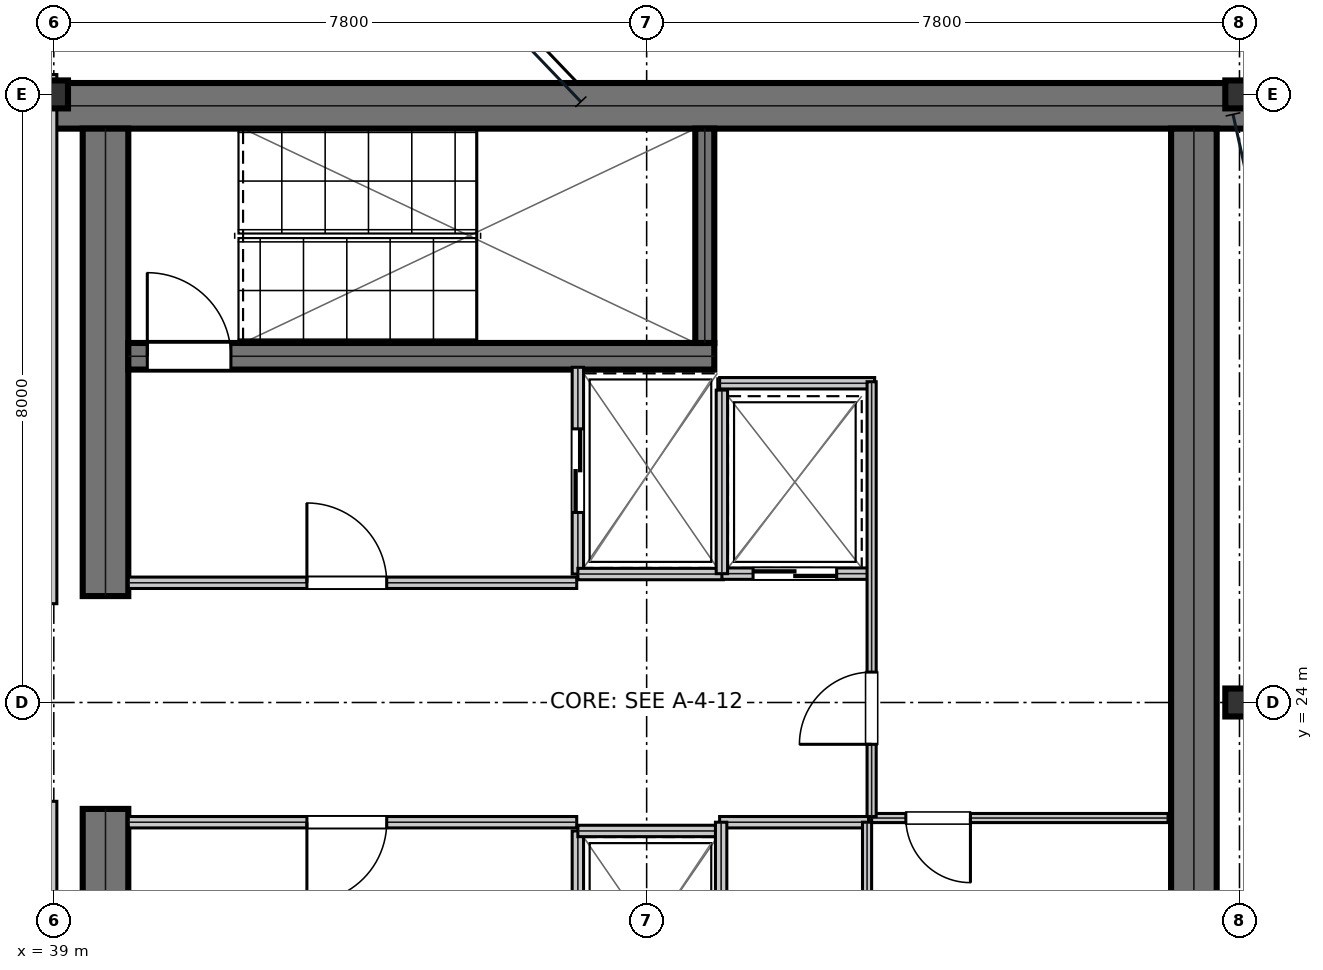
"""IFC4 building model, lengths in metres.
Left out: names, types, materials, properties, quantities, classifications, styles, units other than length and angle.
Written with IfcOpenShell. Run it as: python <this file> out.ifc"""

import sys

from ifc_helpers import new_model, si_unit, direction, frame, frame_2d, origin, origin_2d, place, context, subcontext, project, spatial, rectangle, i_section, extrude, element, fill, save


model = new_model("IFC4")
c1 = context("Model", 3, precision=1e-05, world=origin(), true_north=direction((0.0, 1.0)))
c2 = subcontext(c1, "Body", "Model", "MODEL_VIEW")
j1 = project(units=[si_unit("LENGTHUNIT", "METRE"), si_unit("PLANEANGLEUNIT", "RADIAN")], contexts=[c1])
p1 = place(None, origin())
s1 = spatial("IfcSite", under=j1, at=p1, CompositionType="ELEMENT")
p2 = place(p1, origin())
s2 = spatial("IfcBuilding", under=s1, at=p2, CompositionType="ELEMENT")
p3 = place(p2, frame((0.0, 0.0, 299.25)))
s3 = spatial("IfcBuildingStorey", under=s2, at=p3, CompositionType="ELEMENT", Elevation=299.25)
p4 = place(p3, frame((38.8, 31.85, 0.0), z_axis=(0.0, 0.0, 1.0), x_axis=(1.0, 0.0, 0.0)))
e1 = element("IfcWall", 1, at=p4, inside=s3, PredefinedType="SHEAR", context=c2, shape_type="SweptSolid", body=[
    extrude(rectangle(XDim=16.0, YDim=0.6, at=frame_2d((8.0, 0.0))), origin(), (0.0, 0.0, 1.0), 3.81),
])
for number, where, z_axis, x_axis in (
    (2, (39.68, 16.45, 0.0), (0.0, 0.0, 1.0), (0.0, 1.0, 0.0)),
    (3, (39.68, 25.4, 0.0), (0.0, 0.0, 1.0), (0.0, 1.0, 0.0)),
):
    element("IfcWall", number, at=place(p3, frame(where, z_axis=z_axis, x_axis=x_axis)), inside=s3, PredefinedType="SHEAR", context=c2, shape_type="SweptSolid", body=[
        extrude(rectangle(XDim=6.15, YDim=0.6, at=frame_2d((3.075, 0.0))), origin(), (0.0, 0.0, 1.0), 3.81),
    ])
p5 = place(p3, frame((54.0, 16.45, 0.0), z_axis=(0.0, 0.0, 1.0), x_axis=(0.0, 1.0, 0.0)))
e4 = element("IfcWall", 4, at=p5, inside=s3, PredefinedType="SHEAR", context=c2, shape_type="SweptSolid", body=[
    extrude(rectangle(XDim=15.1, YDim=0.6, at=frame_2d((7.55, 0.0))), origin(), (0.0, 0.0, 1.0), 3.81),
])
p6 = place(p3, frame((39.98, 28.555, 0.0), z_axis=(0.0, 0.0, 1.0), x_axis=(1.0, 0.0, 0.0)))
e5 = element("IfcWall", 5, at=p6, inside=s3, PredefinedType="SHEAR", context=c2, shape_type="SweptSolid", body=[
    extrude(rectangle(XDim=7.71, YDim=0.35, at=frame_2d((3.855, 0.0))), origin(), (0.0, 0.0, 1.0), 3.81),
])
p7 = place(p6, frame((0.25, 0.0, 0.0)))
e6 = element("IfcOpeningElement", 6, at=p7, cuts=e5, PredefinedType="OPENING", context=c2, shape_type="SweptSolid", body=[
    extrude(rectangle(XDim=1.1, YDim=2.15, at=frame_2d((0.55, 1.075))), frame((0.0, 0.185, 0.0), z_axis=(0.0, -1.0, 0.0), x_axis=(1.0, 0.0, 0.0)), (0.0, 0.0, 1.0), 0.37),
])
p8 = place(p3, frame((47.565, 28.73, 0.0), z_axis=(0.0, 0.0, 1.0), x_axis=(0.0, 1.0, 0.0)))
e7 = element("IfcWall", 7, at=p8, inside=s3, PredefinedType="SHEAR", context=c2, shape_type="SweptSolid", body=[
    extrude(rectangle(XDim=2.82, YDim=0.25, at=frame_2d((1.41, 0.0))), origin(), (0.0, 0.0, 1.0), 3.81),
])
for number, where, z_axis, x_axis in (
    (8, (39.0, 32.0, 0.0), (0.0, 0.0, 1.0), (1.0, 0.0, 0.0)),
    (9, (54.6, 24.0, 0.0), (0.0, 0.0, 1.0), (1.0, 0.0, 0.0)),
    (10, (54.6, 32.0, 0.0), (0.0, 0.0, 1.0), (1.0, 0.0, 0.0)),
):
    element("IfcColumn", number, at=place(p3, frame(where, z_axis=z_axis, x_axis=x_axis)), inside=s3, PredefinedType="COLUMN", context=c2, shape_type="SweptSolid", body=[
        extrude(i_section(OverallWidth=0.373, OverallDepth=0.368, WebThickness=0.015, FlangeThickness=0.024, at=origin_2d()), origin(), (0.0, 0.0, 1.0), 4.044),
    ])
p9 = place(p3, frame((39.98, 25.575, 0.0), z_axis=(0.0, 0.0, 1.0), x_axis=(1.0, 0.0, 0.0)))
e11 = element("IfcWall", 11, at=p9, inside=s3, PredefinedType="PARTITIONING", context=c2, shape_type="SweptSolid", body=[
    extrude(rectangle(XDim=5.9, YDim=0.15, at=frame_2d((2.95, 0.0))), origin(), (0.0, 0.0, 1.0), 3.81),
])
p10 = place(p9, frame((2.35, 0.0, 0.0)))
e12 = element("IfcOpeningElement", 12, at=p10, cuts=e11, PredefinedType="OPENING", context=c2, shape_type="SweptSolid", body=[
    extrude(rectangle(XDim=1.05, YDim=2.15, at=frame_2d((0.525, 1.075))), frame((0.0, 0.085, 0.0), z_axis=(0.0, -1.0, 0.0), x_axis=(1.0, 0.0, 0.0)), (0.0, 0.0, 1.0), 0.17),
])
p11 = place(p3, frame((39.98, 22.425, 0.0), z_axis=(0.0, 0.0, 1.0), x_axis=(1.0, 0.0, 0.0)))
e13 = element("IfcWall", 13, at=p11, inside=s3, PredefinedType="PARTITIONING", context=c2, shape_type="SweptSolid", body=[
    extrude(rectangle(XDim=5.9, YDim=0.15, at=frame_2d((2.95, 0.0))), origin(), (0.0, 0.0, 1.0), 3.81),
])
p12 = place(p11, frame((2.35, 0.0, 0.0)))
e14 = element("IfcOpeningElement", 14, at=p12, cuts=e13, PredefinedType="OPENING", context=c2, shape_type="SweptSolid", body=[
    extrude(rectangle(XDim=1.05, YDim=2.15, at=frame_2d((0.525, 1.075))), frame((0.0, 0.085, 0.0), z_axis=(0.0, -1.0, 0.0), x_axis=(1.0, 0.0, 0.0)), (0.0, 0.0, 1.0), 0.17),
])
p13 = place(p3, frame((45.895, 25.69, 0.0), z_axis=(0.0, 0.0, 1.0), x_axis=(0.0, 1.0, 0.0)))
e15 = element("IfcWall", 15, at=p13, inside=s3, PredefinedType="PARTITIONING", context=c2, shape_type="SweptSolid", body=[
    extrude(rectangle(XDim=2.72, YDim=0.15, at=frame_2d((1.36, 0.0))), origin(), (0.0, 0.0, 1.0), 3.81),
])
p14 = place(p13, frame((0.81, 0.0, 0.0)))
e16 = element("IfcOpeningElement", 16, at=p14, cuts=e15, PredefinedType="OPENING", context=c2, shape_type="SweptSolid", body=[
    extrude(rectangle(XDim=1.1, YDim=2.15, at=frame_2d((0.55, 1.075))), frame((0.0, 0.085, 0.0), z_axis=(0.0, -1.0, 0.0), x_axis=(1.0, 0.0, 0.0)), (0.0, 0.0, 1.0), 0.17),
])
p15 = place(p3, frame((45.895, 25.69, 0.0), z_axis=(0.0, 0.0, 1.0), x_axis=(1.0, 0.0, 0.0)))
e17 = element("IfcWall", 17, at=p15, inside=s3, PredefinedType="PARTITIONING", context=c2, shape_type="SweptSolid", body=[
    extrude(rectangle(XDim=1.915, YDim=0.15, at=frame_2d((0.958, 0.0))), origin(), (0.0, 0.0, 1.0), 3.81),
])
p16 = place(p3, frame((45.895, 19.59, 0.0), z_axis=(0.0, 0.0, 1.0), x_axis=(0.0, 1.0, 0.0)))
e18 = element("IfcWall", 18, at=p16, inside=s3, PredefinedType="PARTITIONING", context=c2, shape_type="SweptSolid", body=[
    extrude(rectangle(XDim=2.72, YDim=0.15, at=frame_2d((1.36, 0.0))), origin(), (0.0, 0.0, 1.0), 3.81),
])
p17 = place(p16, frame((0.81, 0.0, 0.0)))
e19 = element("IfcOpeningElement", 19, at=p17, cuts=e18, PredefinedType="OPENING", context=c2, shape_type="SweptSolid", body=[
    extrude(rectangle(XDim=1.1, YDim=2.15, at=frame_2d((0.55, 1.075))), frame((0.0, 0.085, 0.0), z_axis=(0.0, -1.0, 0.0), x_axis=(1.0, 0.0, 0.0)), (0.0, 0.0, 1.0), 0.17),
])
p18 = place(p3, frame((45.895, 22.31, 0.0), z_axis=(0.0, 0.0, 1.0), x_axis=(1.0, 0.0, 0.0)))
e20 = element("IfcWall", 20, at=p18, inside=s3, PredefinedType="PARTITIONING", context=c2, shape_type="SweptSolid", body=[
    extrude(rectangle(XDim=1.915, YDim=0.15, at=frame_2d((0.958, 0.0))), origin(), (0.0, 0.0, 1.0), 3.81),
])
p19 = place(p3, frame((47.79, 25.695, 0.0), z_axis=(0.0, 0.0, 1.0), x_axis=(1.0, 0.0, 0.0)))
e21 = element("IfcWall", 21, at=p19, inside=s3, PredefinedType="PARTITIONING", context=c2, shape_type="SweptSolid", body=[
    extrude(rectangle(XDim=1.92, YDim=0.15, at=frame_2d((0.96, 0.0))), origin(), (0.0, 0.0, 1.0), 3.81),
])
p20 = place(p19, frame((0.41, 0.0, 0.0)))
e22 = element("IfcOpeningElement", 22, at=p20, cuts=e21, PredefinedType="OPENING", context=c2, shape_type="SweptSolid", body=[
    extrude(rectangle(XDim=1.1, YDim=2.15, at=frame_2d((0.55, 1.075))), frame((0.0, 0.085, 0.0), z_axis=(0.0, -1.0, 0.0), x_axis=(1.0, 0.0, 0.0)), (0.0, 0.0, 1.0), 0.17),
])
p21 = place(p3, frame((47.79, 25.695, 0.0), z_axis=(0.0, 0.0, 1.0), x_axis=(0.0, 1.0, 0.0)))
e23 = element("IfcWall", 23, at=p21, inside=s3, PredefinedType="PARTITIONING", context=c2, shape_type="SweptSolid", body=[
    extrude(rectangle(XDim=2.415, YDim=0.15, at=frame_2d((1.208, 0.0))), origin(), (0.0, 0.0, 1.0), 3.81),
])
p22 = place(p3, frame((47.76, 22.425, 0.0), z_axis=(0.0, 0.0, 1.0), x_axis=(1.0, 0.0, 0.0)))
e24 = element("IfcWall", 24, at=p22, inside=s3, PredefinedType="PARTITIONING", context=c2, shape_type="SweptSolid", body=[
    extrude(rectangle(XDim=1.96, YDim=0.15, at=frame_2d((0.98, 0.0))), origin(), (0.0, 0.0, 1.0), 3.81),
])
p23 = place(p3, frame((47.78, 16.45, 0.0), z_axis=(0.0, 0.0, 1.0), x_axis=(0.0, 1.0, 0.0)))
e25 = element("IfcWall", 25, at=p23, inside=s3, PredefinedType="PARTITIONING", context=c2, shape_type="SweptSolid", body=[
    extrude(rectangle(XDim=5.975, YDim=0.15, at=frame_2d((2.988, 0.0))), origin(), (0.0, 0.0, 1.0), 3.81),
])
p24 = place(p3, frame((49.7, 16.48, 0.0), z_axis=(0.0, 0.0, 1.0), x_axis=(0.0, 1.0, 0.0)))
e26 = element("IfcWall", 26, at=p24, inside=s3, PredefinedType="PARTITIONING", context=c2, shape_type="SweptSolid", body=[
    extrude(rectangle(XDim=5.945, YDim=0.12, at=frame_2d((2.973, 0.0))), origin(), (0.0, 0.0, 1.0), 3.81),
])
p25 = place(p24, frame((1.8, 0.0, 0.0)))
e27 = element("IfcOpeningElement", 27, at=p25, cuts=e26, PredefinedType="OPENING", context=c2, shape_type="SweptSolid", body=[
    extrude(rectangle(XDim=0.85, YDim=2.15, at=frame_2d((0.425, 1.075))), frame((0.0, 0.07, 0.0), z_axis=(0.0, -1.0, 0.0), x_axis=(1.0, 0.0, 0.0)), (0.0, 0.0, 1.0), 0.14),
])
p26 = place(p24, frame((3.85, 0.0, 0.0)))
e28 = element("IfcOpeningElement", 28, at=p26, cuts=e26, PredefinedType="OPENING", context=c2, shape_type="SweptSolid", body=[
    extrude(rectangle(XDim=0.95, YDim=2.15, at=frame_2d((0.475, 1.075))), frame((0.0, 0.07, 0.0), z_axis=(0.0, -1.0, 0.0), x_axis=(1.0, 0.0, 0.0)), (0.0, 0.0, 1.0), 0.14),
])
p27 = place(p3, frame((49.76, 22.48, 0.0), z_axis=(0.0, 0.0, 1.0), x_axis=(1.0, 0.0, 0.0)))
e29 = element("IfcWall", 29, at=p27, inside=s3, PredefinedType="PARTITIONING", context=c2, shape_type="SweptSolid", body=[
    extrude(rectangle(XDim=3.9, YDim=0.12, at=frame_2d((1.95, 0.0))), origin(), (0.0, 0.0, 1.0), 3.81),
])
p28 = place(p27, frame((0.45, 0.0, 0.0)))
e30 = element("IfcOpeningElement", 30, at=p28, cuts=e29, PredefinedType="OPENING", context=c2, shape_type="SweptSolid", body=[
    extrude(rectangle(XDim=0.85, YDim=2.15, at=frame_2d((0.425, 1.075))), frame((0.0, 0.07, 0.0), z_axis=(0.0, -1.0, 0.0), x_axis=(1.0, 0.0, 0.0)), (0.0, 0.0, 1.0), 0.14),
])
p29 = place(p3, frame((47.76, 28.2, 0.0), z_axis=(0.0, 0.0, 1.0), x_axis=(1.0, 0.0, 0.0)))
e31 = element("IfcWall", 31, at=p29, inside=s3, PredefinedType="PARTITIONING", context=c2, shape_type="SweptSolid", body=[
    extrude(rectangle(XDim=2.04, YDim=0.15, at=frame_2d((1.02, 0.0))), origin(), (0.0, 0.0, 1.0), 3.81),
])
p30 = place(p3, frame((49.76, 22.5, 0.0), z_axis=(0.0, 0.0, 1.0), x_axis=(0.0, 1.0, 0.0)))
e32 = element("IfcWall", 32, at=p30, inside=s3, PredefinedType="PARTITIONING", context=c2, shape_type="SweptSolid", body=[
    extrude(rectangle(XDim=5.72, YDim=0.12, at=frame_2d((2.86, 0.0))), origin(), (0.0, 0.0, 1.0), 3.81),
])
p31 = place(p30, frame((0.95, 0.0, 0.0)))
e33 = element("IfcOpeningElement", 33, at=p31, cuts=e32, PredefinedType="OPENING", context=c2, shape_type="SweptSolid", body=[
    extrude(rectangle(XDim=0.95, YDim=2.15, at=frame_2d((0.475, 1.075))), frame((0.0, 0.07, 0.0), z_axis=(0.0, -1.0, 0.0), x_axis=(1.0, 0.0, 0.0)), (0.0, 0.0, 1.0), 0.14),
])
for number, where, z_axis, x_axis in (
    (34, (38.95, 15.739, 0.0), (0.0, 0.0, 1.0), (0.0, 1.0, 0.0)),
    (35, (38.95, 25.3, 0.0), (0.0, 0.0, 1.0), (0.0, 1.0, 0.0)),
):
    element("IfcWall", number, at=place(p3, frame(where, z_axis=z_axis, x_axis=x_axis)), inside=s3, PredefinedType="SOLIDWALL", context=c2, shape_type="SweptSolid", body=[
        extrude(rectangle(XDim=6.961, YDim=0.18, at=frame_2d((3.48, 0.0))), origin(), (0.0, 0.0, 1.0), 3.27),
    ])
p32 = place(p10, origin())
e36 = element("IfcDoor", 36, at=p32, inside=s3, OperationType="SINGLE_SWING_LEFT", PredefinedType="DOOR", context=c2, shape_type="SweptSolid", body=[
    extrude(rectangle(XDim=1.05, YDim=2.15, at=frame_2d((0.525, 1.075))), frame((0.0, 0.025, 0.0), z_axis=(0.0, -1.0, 0.0), x_axis=(1.0, 0.0, 0.0)), (0.0, 0.0, 1.0), 0.05),
])
fill(e12, e36)
p33 = place(p12, frame((1.05, 0.0, 0.0), z_axis=(0.0, 0.0, 1.0), x_axis=(-1.0, 0.0, 0.0)))
e37 = element("IfcDoor", 37, at=p33, inside=s3, OperationType="SINGLE_SWING_RIGHT", PredefinedType="DOOR", context=c2, shape_type="SweptSolid", body=[
    extrude(rectangle(XDim=1.05, YDim=2.15, at=frame_2d((0.525, 1.075))), frame((0.0, 0.025, 0.0), z_axis=(0.0, -1.0, 0.0), x_axis=(1.0, 0.0, 0.0)), (0.0, 0.0, 1.0), 0.05),
])
fill(e14, e37)
p34 = place(p14, frame((1.1, 0.0, 0.0), z_axis=(0.0, 0.0, 1.0), x_axis=(-1.0, 0.0, 0.0)))
e38 = element("IfcDoor", 38, at=p34, inside=s3, OperationType="DOUBLE_DOOR_SLIDING", PredefinedType="DOOR", context=c2, shape_type="SweptSolid", body=[
    extrude(rectangle(XDim=1.1, YDim=2.15, at=frame_2d((0.55, 1.075))), frame((0.0, 0.025, 0.0), z_axis=(0.0, -1.0, 0.0), x_axis=(1.0, 0.0, 0.0)), (0.0, 0.0, 1.0), 0.05),
])
fill(e16, e38)
p35 = place(p20, frame((1.1, 0.0, 0.0), z_axis=(0.0, 0.0, 1.0), x_axis=(-1.0, 0.0, 0.0)))
e39 = element("IfcDoor", 39, at=p35, inside=s3, OperationType="DOUBLE_DOOR_SLIDING", PredefinedType="DOOR", context=c2, shape_type="SweptSolid", body=[
    extrude(rectangle(XDim=1.1, YDim=2.15, at=frame_2d((0.55, 1.075))), frame((0.0, 0.025, 0.0), z_axis=(0.0, -1.0, 0.0), x_axis=(1.0, 0.0, 0.0)), (0.0, 0.0, 1.0), 0.05),
])
fill(e22, e39)
p36 = place(p28, frame((0.85, 0.0, 0.0), z_axis=(0.0, 0.0, 1.0), x_axis=(-1.0, 0.0, 0.0)))
e40 = element("IfcDoor", 40, at=p36, inside=s3, OperationType="SINGLE_SWING_LEFT", PredefinedType="DOOR", context=c2, shape_type="SweptSolid", body=[
    extrude(rectangle(XDim=0.85, YDim=2.15, at=frame_2d((0.425, 1.075))), frame((0.0, 0.025, 0.0), z_axis=(0.0, -1.0, 0.0), x_axis=(1.0, 0.0, 0.0)), (0.0, 0.0, 1.0), 0.05),
])
fill(e30, e40)
p37 = place(p31, origin())
e41 = element("IfcDoor", 41, at=p37, inside=s3, OperationType="SINGLE_SWING_LEFT", PredefinedType="DOOR", context=c2, shape_type="SweptSolid", body=[
    extrude(rectangle(XDim=0.95, YDim=2.15, at=frame_2d((0.475, 1.075))), frame((0.0, 0.025, 0.0), z_axis=(0.0, -1.0, 0.0), x_axis=(1.0, 0.0, 0.0)), (0.0, 0.0, 1.0), 0.05),
])
fill(e33, e41)
p38 = place(p7, origin())
e42 = element("IfcDoor", 42, at=p38, inside=s3, OperationType="SINGLE_SWING_LEFT", PredefinedType="DOOR", context=c2, shape_type="SweptSolid", body=[
    extrude(rectangle(XDim=1.1, YDim=2.15, at=frame_2d((0.55, 1.075))), frame((0.0, 0.025, 0.0), z_axis=(0.0, -1.0, 0.0), x_axis=(1.0, 0.0, 0.0)), (0.0, 0.0, 1.0), 0.05),
])
fill(e6, e42)
save(model, sys.argv[1])
